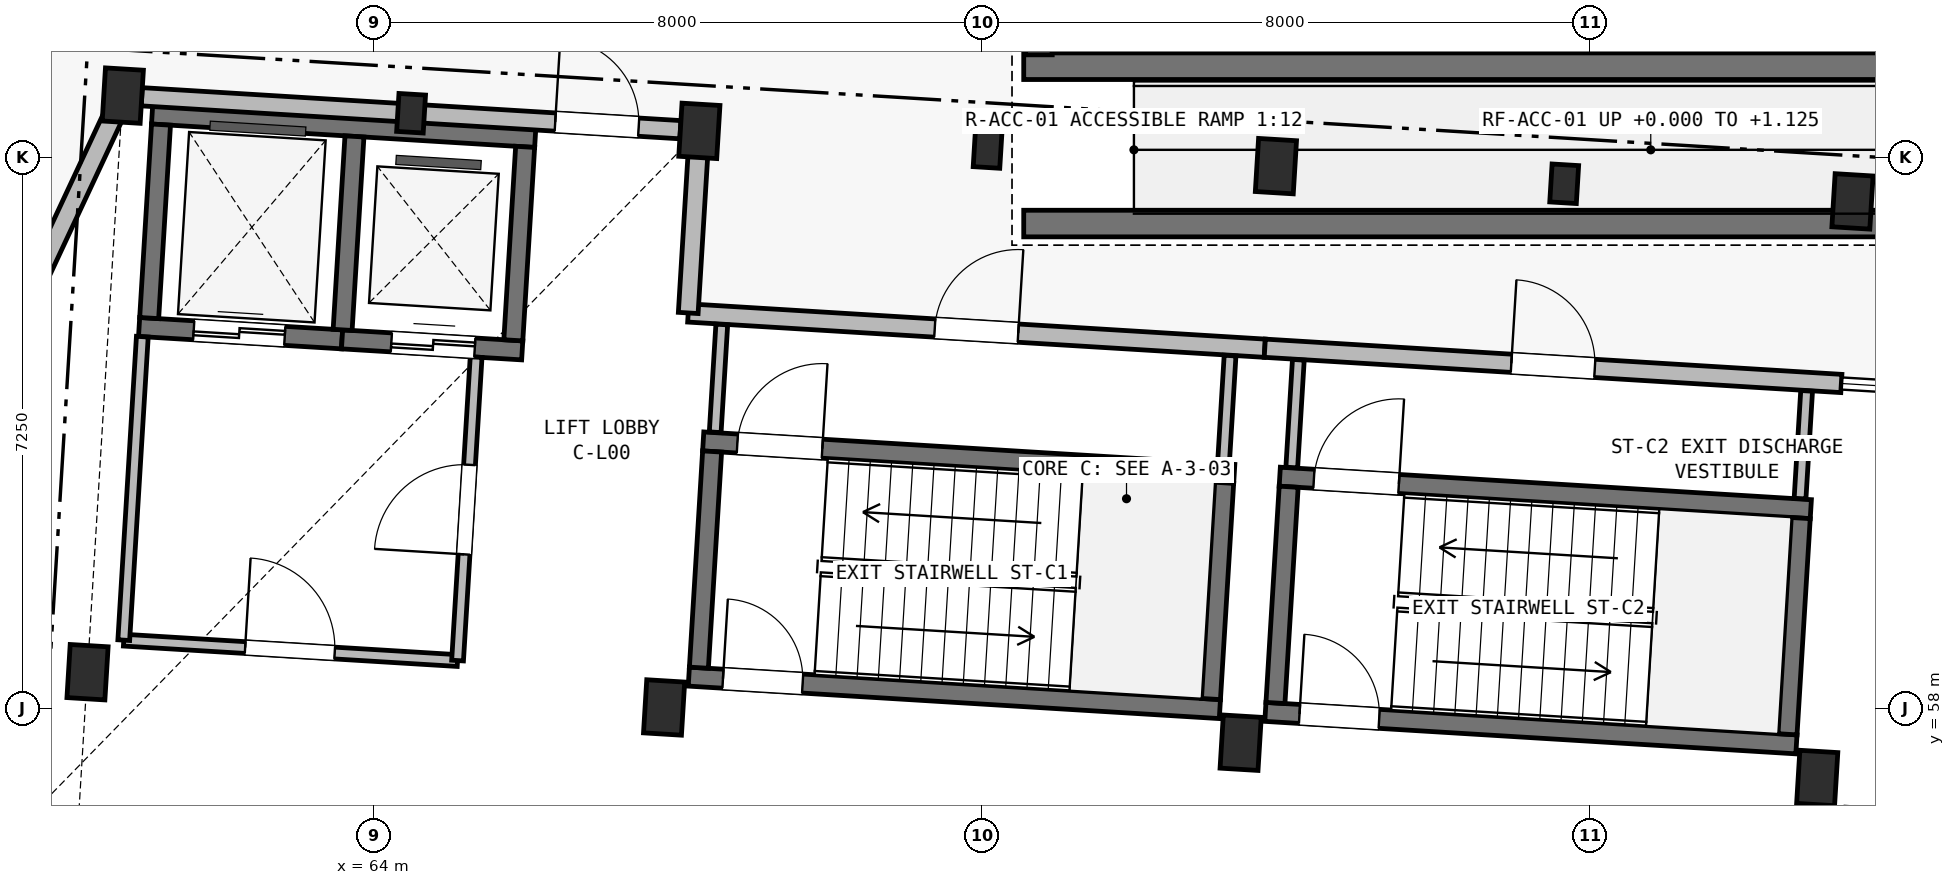
"""IFC4 building model, lengths in metres.
Left out: names, types, materials, properties, quantities, classifications, styles, units other than length and angle.
Written with IfcOpenShell. Run it as: python <this file> out.ifc"""

import sys

from ifc_helpers import new_model, si_unit, direction, frame, frame_2d, origin, origin_2d, place, context, subcontext, project, spatial, rectangle, extrude, element, fill, save


model = new_model("IFC4")
c1 = context("Model", 3, precision=1e-05, world=origin(), true_north=direction((0.0, 1.0)))
c2 = subcontext(c1, "Body", "Model", "MODEL_VIEW")
j1 = project(units=[si_unit("LENGTHUNIT", "METRE"), si_unit("PLANEANGLEUNIT", "RADIAN")], contexts=[c1])
p1 = place(None, origin())
s1 = spatial("IfcSite", under=j1, at=p1, CompositionType="ELEMENT")
p2 = place(p1, origin())
s2 = spatial("IfcBuilding", under=s1, at=p2, CompositionType="ELEMENT")
p3 = place(p2, origin())
s3 = spatial("IfcBuildingStorey", under=s2, at=p3, CompositionType="ELEMENT", Elevation=0.0)
for number, where, z_axis, x_axis in (
    (1, (60.233, 58.478, -0.35), (0.0, 0.0, 1.0), (0.998, -0.061, 0.0)),
    (2, (60.697, 66.063, -0.35), (0.0, 0.0, 1.0), (0.998, -0.061, 0.0)),
    (3, (67.818, 58.014, -0.35), (0.0, 0.0, 1.0), (0.998, -0.061, 0.0)),
    (4, (68.282, 65.599, -0.35), (0.0, 0.0, 1.0), (0.998, -0.061, 0.0)),
    (5, (75.404, 57.55, -0.35), (0.0, 0.0, 1.0), (0.998, -0.061, 0.0)),
    (6, (75.868, 65.135, -0.35), (0.0, 0.0, 1.0), (0.998, -0.061, 0.0)),
    (7, (82.99, 57.086, -0.35), (0.0, 0.0, 1.0), (0.998, -0.061, 0.0)),
    (8, (83.454, 64.672, -0.35), (0.0, 0.0, 1.0), (0.998, -0.061, 0.0)),
):
    element("IfcColumn", number, at=place(p3, frame(where, z_axis=z_axis, x_axis=x_axis)), inside=s3, PredefinedType="COLUMN", context=c2, shape_type="SweptSolid", body=[
        extrude(rectangle(XDim=0.5, YDim=0.7, at=origin_2d()), origin(), (0.0, 0.0, 1.0), 4.85),
    ])
for number, where, z_axis, x_axis in (
    (9, (64.49, 65.832, -0.35), (0.0, 0.0, 1.0), (0.998, -0.061, 0.0)),
    (10, (72.075, 65.367, -0.35), (0.0, 0.0, 1.0), (0.998, -0.061, 0.0)),
    (11, (79.661, 64.904, -0.35), (0.0, 0.0, 1.0), (0.998, -0.061, 0.0)),
):
    element("IfcColumn", number, at=place(p3, frame(where, z_axis=z_axis, x_axis=x_axis)), inside=s3, PredefinedType="PILASTER", context=c2, shape_type="SweptSolid", body=[
        extrude(rectangle(XDim=0.35, YDim=0.5, at=origin_2d()), origin(), (0.0, 0.0, 1.0), 3.7),
    ])
p4 = place(p3, frame((61.082, 65.814, -0.35), z_axis=(0.0, 0.0, 1.0), x_axis=(0.998134101522, -0.061059932685, 0.0)))
e12 = element("IfcWall", 12, at=p4, inside=s3, PredefinedType="SHEAR", context=c2, shape_type="SweptSolid", body=[
    extrude(rectangle(XDim=5.05, YDim=0.25, at=frame_2d((2.525, 0.0))), origin(), (0.0, 0.0, 1.0), 4.85),
])
p5 = place(p3, frame((60.911, 63.02, -0.35), z_axis=(0.0, 0.0, 1.0), x_axis=(0.998134099905, -0.061059959111, 0.0)))
e13 = element("IfcWall", 13, at=p5, inside=s3, PredefinedType="SHEAR", context=c2, shape_type="SweptSolid", body=[
    extrude(rectangle(XDim=2.675, YDim=0.25, at=frame_2d((1.337, 0.0))), origin(), (0.0, 0.0, 1.0), 4.85),
])
p6 = place(p5, frame((0.72, 0.0, 0.35)))
e14 = element("IfcOpeningElement", 14, at=p6, cuts=e13, PredefinedType="OPENING", context=c2, shape_type="SweptSolid", body=[
    extrude(rectangle(XDim=1.2, YDim=2.2, at=frame_2d((0.6, 1.1))), frame((0.0, 0.14, 0.0), z_axis=(0.0, -1.0, 0.0), x_axis=(1.0, 0.0, 0.0)), (0.0, 0.0, 1.0), 0.28),
])
p7 = place(p3, frame((63.581, 62.856, -0.35), z_axis=(0.0, 0.0, 1.0), x_axis=(0.998134103342, -0.061059902923, 0.0)))
e15 = element("IfcWall", 15, at=p7, inside=s3, PredefinedType="SHEAR", context=c2, shape_type="SweptSolid", body=[
    extrude(rectangle(XDim=2.375, YDim=0.25, at=frame_2d((1.188, 0.0))), origin(), (0.0, 0.0, 1.0), 4.85),
])
p8 = place(p7, frame((0.65, 0.0, 0.35)))
e16 = element("IfcOpeningElement", 16, at=p8, cuts=e15, PredefinedType="OPENING", context=c2, shape_type="SweptSolid", body=[
    extrude(rectangle(XDim=1.1, YDim=2.15, at=frame_2d((0.55, 1.075))), frame((0.0, 0.14, 0.0), z_axis=(0.0, -1.0, 0.0), x_axis=(1.0, 0.0, 0.0)), (0.0, 0.0, 1.0), 0.28),
])
p9 = place(p3, frame((61.043, 63.137, -0.35), z_axis=(0.0, 0.0, 1.0), x_axis=(0.061078919587, 0.998132939834, 0.0)))
e17 = element("IfcWall", 17, at=p9, inside=s3, PredefinedType="SHEAR", context=c2, shape_type="SweptSolid", body=[
    extrude(rectangle(XDim=2.55, YDim=0.25, at=frame_2d((1.275, 0.0))), origin(), (0.0, 0.0, 1.0), 4.85),
])
p10 = place(p3, frame((63.589, 62.981, -0.35), z_axis=(0.0, 0.0, 1.0), x_axis=(0.060989368901, 0.998138415692, 0.0)))
e18 = element("IfcWall", 18, at=p10, inside=s3, PredefinedType="SHEAR", context=c2, shape_type="SweptSolid", body=[
    extrude(rectangle(XDim=2.55, YDim=0.25, at=frame_2d((1.275, 0.0))), origin(), (0.0, 0.0, 1.0), 4.85),
])
p11 = place(p3, frame((65.834, 62.844, -0.35), z_axis=(0.0, 0.0, 1.0), x_axis=(0.061084756616, 0.998132582631, 0.0)))
e19 = element("IfcWall", 19, at=p11, inside=s3, PredefinedType="SHEAR", context=c2, shape_type="SweptSolid", body=[
    extrude(rectangle(XDim=2.55, YDim=0.25, at=frame_2d((1.275, 0.0))), origin(), (0.0, 0.0, 1.0), 4.85),
])
p12 = place(p3, frame((68.333, 61.514, -0.35), z_axis=(0.0, 0.0, 1.0), x_axis=(0.998135676081, -0.061034188237, 0.0)))
e20 = element("IfcWall", 20, at=p12, inside=s3, PredefinedType="SHEAR", context=c2, shape_type="SweptSolid", body=[
    extrude(rectangle(XDim=7.0, YDim=0.25, at=frame_2d((3.5, 0.0))), origin(), (0.0, 0.0, 1.0), 4.85),
])
p13 = place(p12, frame((0.45, 0.0, 0.35)))
e21 = element("IfcOpeningElement", 21, at=p13, cuts=e20, PredefinedType="OPENING", context=c2, shape_type="SweptSolid", body=[
    extrude(rectangle(XDim=1.12, YDim=2.15, at=frame_2d((0.56, 1.075))), frame((0.0, 0.14, 0.0), z_axis=(0.0, -1.0, 0.0), x_axis=(1.0, 0.0, 0.0)), (0.0, 0.0, 1.0), 0.28),
])
p14 = place(p3, frame((68.144, 58.419, -0.35), z_axis=(0.0, 0.0, 1.0), x_axis=(0.998135546153, -0.061036313012, 0.0)))
e22 = element("IfcWall", 22, at=p14, inside=s3, PredefinedType="SHEAR", context=c2, shape_type="SweptSolid", body=[
    extrude(rectangle(XDim=7.0, YDim=0.25, at=frame_2d((3.5, 0.0))), origin(), (0.0, 0.0, 1.0), 4.85),
])
p15 = place(p14, frame((0.45, 0.0, 0.35)))
e23 = element("IfcOpeningElement", 23, at=p15, cuts=e22, PredefinedType="OPENING", context=c2, shape_type="SweptSolid", body=[
    extrude(rectangle(XDim=1.05, YDim=2.15, at=frame_2d((0.525, 1.075))), frame((0.0, 0.14, 0.0), z_axis=(0.0, -1.0, 0.0), x_axis=(1.0, 0.0, 0.0)), (0.0, 0.0, 1.0), 0.28),
])
for number, where, z_axis, x_axis in (
    (24, (68.276, 58.537, -0.35), (0.0, 0.0, 1.0), (0.061, 0.998, 0.0)),
    (25, (75.014, 58.125, -0.35), (0.0, 0.0, 1.0), (0.061, 0.998, 0.0)),
):
    element("IfcWall", number, at=place(p3, frame(where, z_axis=z_axis, x_axis=x_axis)), inside=s3, PredefinedType="SHEAR", context=c2, shape_type="SweptSolid", body=[
        extrude(rectangle(XDim=2.85, YDim=0.25, at=frame_2d((1.425, 0.0))), origin(), (0.0, 0.0, 1.0), 4.85),
    ])
p16 = place(p3, frame((75.919, 61.05, -0.35), z_axis=(0.0, 0.0, 1.0), x_axis=(0.998135546153, -0.061036313012, 0.0)))
e26 = element("IfcWall", 26, at=p16, inside=s3, PredefinedType="SHEAR", context=c2, shape_type="SweptSolid", body=[
    extrude(rectangle(XDim=7.0, YDim=0.25, at=frame_2d((3.5, 0.0))), origin(), (0.0, 0.0, 1.0), 4.85),
])
p17 = place(p16, frame((0.45, 0.0, 0.35)))
e27 = element("IfcOpeningElement", 27, at=p17, cuts=e26, PredefinedType="OPENING", context=c2, shape_type="SweptSolid", body=[
    extrude(rectangle(XDim=1.12, YDim=2.15, at=frame_2d((0.56, 1.075))), frame((0.0, 0.14, 0.0), z_axis=(0.0, -1.0, 0.0), x_axis=(1.0, 0.0, 0.0)), (0.0, 0.0, 1.0), 0.28),
])
p18 = place(p3, frame((75.73, 57.956, -0.35), z_axis=(0.0, 0.0, 1.0), x_axis=(0.998135546153, -0.061036313012, 0.0)))
e28 = element("IfcWall", 28, at=p18, inside=s3, PredefinedType="SHEAR", context=c2, shape_type="SweptSolid", body=[
    extrude(rectangle(XDim=7.0, YDim=0.25, at=frame_2d((3.5, 0.0))), origin(), (0.0, 0.0, 1.0), 4.85),
])
p19 = place(p18, frame((0.45, 0.0, 0.35)))
e29 = element("IfcOpeningElement", 29, at=p19, cuts=e28, PredefinedType="OPENING", context=c2, shape_type="SweptSolid", body=[
    extrude(rectangle(XDim=1.05, YDim=2.15, at=frame_2d((0.525, 1.075))), frame((0.0, 0.14, 0.0), z_axis=(0.0, -1.0, 0.0), x_axis=(1.0, 0.0, 0.0)), (0.0, 0.0, 1.0), 0.28),
])
for number, where, z_axis, x_axis in (
    (30, (75.862, 58.073, -0.35), (0.0, 0.0, 1.0), (0.061, 0.998, 0.0)),
    (31, (82.599, 57.661, -0.35), (0.0, 0.0, 1.0), (0.061, 0.998, 0.0)),
):
    element("IfcWall", number, at=place(p3, frame(where, z_axis=z_axis, x_axis=x_axis)), inside=s3, PredefinedType="SHEAR", context=c2, shape_type="SweptSolid", body=[
        extrude(rectangle(XDim=2.85, YDim=0.25, at=frame_2d((1.425, 0.0))), origin(), (0.0, 0.0, 1.0), 4.85),
    ])
p20 = place(p3, frame((72.55, 64.38, -0.35), z_axis=(0.0, 0.0, 1.0), x_axis=(1.0, 0.0, 0.0)))
e32 = element("IfcWall", 32, at=p20, inside=s3, PredefinedType="USERDEFINED", context=c2, shape_type="SweptSolid", body=[
    extrude(rectangle(XDim=33.1, YDim=0.35, at=frame_2d((16.55, 0.0))), origin(), (0.0, 0.0, 1.0), 3.75),
])
p21 = place(p3, frame((72.55, 66.45, -0.35), z_axis=(0.0, 0.0, 1.0), x_axis=(1.0, 0.0, 0.0)))
e33 = element("IfcWall", 33, at=p21, inside=s3, PredefinedType="USERDEFINED", context=c2, shape_type="SweptSolid", body=[
    extrude(rectangle(XDim=33.1, YDim=0.35, at=frame_2d((16.55, 0.0))), origin(), (0.0, 0.0, 1.0), 5.97),
])
p22 = place(p3, frame((72.75, 66.6, -0.35), z_axis=(0.0, 0.0, 1.0), x_axis=(0.0, 1.0, 0.0)))
e34 = element("IfcWall", 34, at=p22, inside=s3, PredefinedType="USERDEFINED", context=c2, shape_type="SweptSolid", body=[
    extrude(rectangle(XDim=1.5, YDim=0.35, at=frame_2d((0.75, 0.0))), origin(), (0.0, 0.0, 1.0), 4.55),
])
p23 = place(p3, frame((60.946, 66.048, 0.0), z_axis=(0.0, 0.0, 1.0), x_axis=(0.99813569621, -0.061033859059, 0.0)))
e35 = element("IfcWall", 35, at=p23, inside=s3, PredefinedType="SOLIDWALL", context=c2, shape_type="SweptSolid", body=[
    extrude(rectangle(XDim=7.1, YDim=0.24, at=frame_2d((3.55, 0.0))), origin(), (0.0, 0.0, 1.0), 3.35),
])
p24 = place(p23, frame((5.45, 0.0, 0.0)))
e36 = element("IfcOpeningElement", 36, at=p24, cuts=e35, PredefinedType="OPENING", context=c2, shape_type="SweptSolid", body=[
    extrude(rectangle(XDim=1.1, YDim=2.15, at=frame_2d((0.55, 1.075))), frame((0.0, 0.135, 0.0), z_axis=(0.0, -1.0, 0.0), x_axis=(1.0, 0.0, 0.0)), (0.0, 0.0, 1.0), 0.27),
])
p25 = place(p3, frame((68.136, 63.204, 0.0), z_axis=(0.0, 0.0, 1.0), x_axis=(0.998135669243, -0.061034300063, 0.0)))
e37 = element("IfcWall", 37, at=p25, inside=s3, PredefinedType="SOLIDWALL", context=c2, shape_type="SweptSolid", body=[
    extrude(rectangle(XDim=7.6, YDim=0.24, at=frame_2d((3.8, 0.0))), origin(), (0.0, 0.0, 1.0), 3.35),
])
p26 = place(p25, frame((3.25, 0.0, 0.0)))
e38 = element("IfcOpeningElement", 38, at=p26, cuts=e37, PredefinedType="OPENING", context=c2, shape_type="SweptSolid", body=[
    extrude(rectangle(XDim=1.1, YDim=2.15, at=frame_2d((0.55, 1.075))), frame((0.0, 0.135, 0.0), z_axis=(0.0, -1.0, 0.0), x_axis=(1.0, 0.0, 0.0)), (0.0, 0.0, 1.0), 0.27),
])
p27 = place(p3, frame((75.722, 62.74, 0.0), z_axis=(0.0, 0.0, 1.0), x_axis=(0.998135669243, -0.061034300063, 0.0)))
e39 = element("IfcWall", 39, at=p27, inside=s3, PredefinedType="SOLIDWALL", context=c2, shape_type="SweptSolid", body=[
    extrude(rectangle(XDim=7.6, YDim=0.24, at=frame_2d((3.8, 0.0))), origin(), (0.0, 0.0, 1.0), 3.35),
])
p28 = place(p27, frame((3.25, 0.0, 0.0)))
e40 = element("IfcOpeningElement", 40, at=p28, cuts=e39, PredefinedType="OPENING", context=c2, shape_type="SweptSolid", body=[
    extrude(rectangle(XDim=1.1, YDim=2.15, at=frame_2d((0.55, 1.075))), frame((0.0, 0.135, 0.0), z_axis=(0.0, -1.0, 0.0), x_axis=(1.0, 0.0, 0.0)), (0.0, 0.0, 1.0), 0.27),
])
p29 = place(p3, frame((53.32, 50.284, 0.0), z_axis=(0.0, 0.0, 1.0), x_axis=(0.423516863973, 0.905888219335, 0.0)))
e41 = element("IfcWall", 41, at=p29, inside=s3, PredefinedType="SOLIDWALL", context=c2, shape_type="SweptSolid", body=[
    extrude(rectangle(XDim=17.418, YDim=0.26, at=frame_2d((8.709, 0.0))), origin(), (0.0, 0.0, 1.0), 3.35),
])
p30 = place(p3, frame((68.282, 65.599, 0.0), z_axis=(0.0, 0.0, 1.0), x_axis=(-0.061136950836, -0.998129387025, 0.0)))
e42 = element("IfcWall", 42, at=p30, inside=s3, PredefinedType="SOLIDWALL", context=c2, shape_type="SweptSolid", body=[
    extrude(rectangle(XDim=2.4, YDim=0.26, at=frame_2d((1.2, 0.0))), origin(), (0.0, 0.0, 1.0), 3.35),
])
p31 = place(p3, frame((60.709, 58.899, 0.0), z_axis=(0.0, 0.0, 1.0), x_axis=(0.998132276607, -0.061089756882, 0.0)))
e43 = element("IfcWall", 43, at=p31, inside=s3, PredefinedType="PARTITIONING", context=c2, shape_type="SweptSolid", body=[
    extrude(rectangle(XDim=4.4, YDim=0.155, at=frame_2d((2.2, 0.0))), origin(), (0.0, 0.0, 1.0), 4.22),
])
p32 = place(p31, frame((1.6, 0.0, 0.0)))
e44 = element("IfcOpeningElement", 44, at=p32, cuts=e43, PredefinedType="OPENING", context=c2, shape_type="SweptSolid", body=[
    extrude(rectangle(XDim=1.18, YDim=2.15, at=frame_2d((0.59, 1.075))), frame((0.0, 0.093, 0.0), z_axis=(0.0, -1.0, 0.0), x_axis=(1.0, 0.0, 0.0)), (0.0, 0.0, 1.0), 0.185),
])
p33 = place(p3, frame((60.709, 58.899, 0.0), z_axis=(0.0, 0.0, 1.0), x_axis=(0.061036844229, 0.998135513669, 0.0)))
e45 = element("IfcWall", 45, at=p33, inside=s3, PredefinedType="PARTITIONING", context=c2, shape_type="SweptSolid", body=[
    extrude(rectangle(XDim=4.0, YDim=0.155, at=frame_2d((2.0, 0.0))), origin(), (0.0, 0.0, 1.0), 3.35),
])
p34 = place(p3, frame((65.101, 58.631, 0.0), z_axis=(0.0, 0.0, 1.0), x_axis=(0.061033125904, 0.99813574104, 0.0)))
e46 = element("IfcWall", 46, at=p34, inside=s3, PredefinedType="PARTITIONING", context=c2, shape_type="SweptSolid", body=[
    extrude(rectangle(XDim=4.0, YDim=0.155, at=frame_2d((2.0, 0.0))), origin(), (0.0, 0.0, 1.0), 4.22),
])
p35 = place(p34, frame((1.4, 0.0, 0.0)))
e47 = element("IfcOpeningElement", 47, at=p35, cuts=e46, PredefinedType="OPENING", context=c2, shape_type="SweptSolid", body=[
    extrude(rectangle(XDim=1.18, YDim=2.15, at=frame_2d((0.59, 1.075))), frame((0.0, 0.093, 0.0), z_axis=(0.0, -1.0, 0.0), x_axis=(1.0, 0.0, 0.0)), (0.0, 0.0, 1.0), 0.185),
])
p36 = place(p3, frame((68.491, 61.634, 0.0), z_axis=(0.0, 0.0, 1.0), x_axis=(0.06102966984, 0.998135952363, 0.0)))
e48 = element("IfcWall", 48, at=p36, inside=s3, PredefinedType="PARTITIONING", context=c2, shape_type="SweptSolid", body=[
    extrude(rectangle(XDim=1.42, YDim=0.155, at=frame_2d((0.71, 0.0))), origin(), (0.0, 0.0, 1.0), 3.35),
])
for number, where, z_axis, x_axis in (
    (49, (75.178, 61.225, 0.0), (0.0, 0.0, 1.0), (0.061, 0.998, 0.0)),
    (50, (76.076, 61.17, 0.0), (0.0, 0.0, 1.0), (0.061, 0.998, 0.0)),
    (51, (82.764, 60.761, 0.0), (0.0, 0.0, 1.0), (0.061, 0.998, 0.0)),
):
    element("IfcWall", number, at=place(p3, frame(where, z_axis=z_axis, x_axis=x_axis)), inside=s3, PredefinedType="PARTITIONING", context=c2, shape_type="SweptSolid", body=[
        extrude(rectangle(XDim=1.42, YDim=0.155, at=frame_2d((0.71, 0.0))), origin(), (0.0, 0.0, 1.0), 3.35),
    ])
p37 = place(p24, origin())
e52 = element("IfcDoor", 52, at=p37, inside=s3, OperationType="SINGLE_SWING_LEFT", PredefinedType="DOOR", context=c2, shape_type="SweptSolid", body=[
    extrude(rectangle(XDim=1.1, YDim=2.15, at=frame_2d((0.55, 1.075))), frame((0.0, 0.025, 0.0), z_axis=(0.0, -1.0, 0.0), x_axis=(1.0, 0.0, 0.0)), (0.0, 0.0, 1.0), 0.05),
])
fill(e36, e52)
p38 = place(p26, origin())
e53 = element("IfcDoor", 53, at=p38, inside=s3, OperationType="SINGLE_SWING_RIGHT", PredefinedType="DOOR", context=c2, shape_type="SweptSolid", body=[
    extrude(rectangle(XDim=1.1, YDim=2.15, at=frame_2d((0.55, 1.075))), frame((0.0, 0.025, 0.0), z_axis=(0.0, -1.0, 0.0), x_axis=(1.0, 0.0, 0.0)), (0.0, 0.0, 1.0), 0.05),
])
fill(e38, e53)
p39 = place(p28, origin())
e54 = element("IfcDoor", 54, at=p39, inside=s3, OperationType="SINGLE_SWING_LEFT", PredefinedType="DOOR", context=c2, shape_type="SweptSolid", body=[
    extrude(rectangle(XDim=1.1, YDim=2.15, at=frame_2d((0.55, 1.075))), frame((0.0, 0.025, 0.0), z_axis=(0.0, -1.0, 0.0), x_axis=(1.0, 0.0, 0.0)), (0.0, 0.0, 1.0), 0.05),
])
fill(e40, e54)
p40 = place(p32, origin())
e55 = element("IfcDoor", 55, at=p40, inside=s3, OperationType="SINGLE_SWING_LEFT", PredefinedType="DOOR", context=c2, shape_type="SweptSolid", body=[
    extrude(rectangle(XDim=1.18, YDim=2.15, at=frame_2d((0.59, 1.075))), frame((0.0, 0.025, 0.0), z_axis=(0.0, -1.0, 0.0), x_axis=(1.0, 0.0, 0.0)), (0.0, 0.0, 1.0), 0.05),
])
fill(e44, e55)
p41 = place(p35, origin())
e56 = element("IfcDoor", 56, at=p41, inside=s3, OperationType="SINGLE_SWING_LEFT", PredefinedType="DOOR", context=c2, shape_type="SweptSolid", body=[
    extrude(rectangle(XDim=1.18, YDim=2.15, at=frame_2d((0.59, 1.075))), frame((0.0, 0.025, 0.0), z_axis=(0.0, -1.0, 0.0), x_axis=(1.0, 0.0, 0.0)), (0.0, 0.0, 1.0), 0.05),
])
fill(e47, e56)
p42 = place(p15, origin())
e57 = element("IfcDoor", 57, at=p42, inside=s3, OperationType="SINGLE_SWING_LEFT", PredefinedType="DOOR", context=c2, shape_type="SweptSolid", body=[
    extrude(rectangle(XDim=1.05, YDim=2.15, at=frame_2d((0.525, 1.075))), frame((0.0, 0.025, 0.0), z_axis=(0.0, -1.0, 0.0), x_axis=(1.0, 0.0, 0.0)), (0.0, 0.0, 1.0), 0.05),
])
fill(e23, e57)
p43 = place(p13, origin())
e58 = element("IfcDoor", 58, at=p43, inside=s3, OperationType="SINGLE_SWING_RIGHT", PredefinedType="DOOR", context=c2, shape_type="SweptSolid", body=[
    extrude(rectangle(XDim=1.12, YDim=2.15, at=frame_2d((0.56, 1.075))), frame((0.0, 0.025, 0.0), z_axis=(0.0, -1.0, 0.0), x_axis=(1.0, 0.0, 0.0)), (0.0, 0.0, 1.0), 0.05),
])
fill(e21, e58)
p44 = place(p19, origin())
e59 = element("IfcDoor", 59, at=p44, inside=s3, OperationType="SINGLE_SWING_LEFT", PredefinedType="DOOR", context=c2, shape_type="SweptSolid", body=[
    extrude(rectangle(XDim=1.05, YDim=2.15, at=frame_2d((0.525, 1.075))), frame((0.0, 0.025, 0.0), z_axis=(0.0, -1.0, 0.0), x_axis=(1.0, 0.0, 0.0)), (0.0, 0.0, 1.0), 0.05),
])
fill(e29, e59)
p45 = place(p17, origin())
e60 = element("IfcDoor", 60, at=p45, inside=s3, OperationType="SINGLE_SWING_RIGHT", PredefinedType="DOOR", context=c2, shape_type="SweptSolid", body=[
    extrude(rectangle(XDim=1.12, YDim=2.15, at=frame_2d((0.56, 1.075))), frame((0.0, 0.025, 0.0), z_axis=(0.0, -1.0, 0.0), x_axis=(1.0, 0.0, 0.0)), (0.0, 0.0, 1.0), 0.05),
])
fill(e27, e60)
p46 = place(p6, origin())
e61 = element("IfcDoor", 61, at=p46, inside=s3, OperationType="DOUBLE_DOOR_SLIDING", PredefinedType="DOOR", context=c2, shape_type="SweptSolid", body=[
    extrude(rectangle(XDim=1.2, YDim=2.2, at=frame_2d((0.6, 1.1))), frame((0.0, 0.025, 0.0), z_axis=(0.0, -1.0, 0.0), x_axis=(1.0, 0.0, 0.0)), (0.0, 0.0, 1.0), 0.05),
])
fill(e14, e61)
p47 = place(p8, origin())
e62 = element("IfcDoor", 62, at=p47, inside=s3, OperationType="DOUBLE_DOOR_SLIDING", PredefinedType="DOOR", context=c2, shape_type="SweptSolid", body=[
    extrude(rectangle(XDim=1.1, YDim=2.15, at=frame_2d((0.55, 1.075))), frame((0.0, 0.025, 0.0), z_axis=(0.0, -1.0, 0.0), x_axis=(1.0, 0.0, 0.0)), (0.0, 0.0, 1.0), 0.05),
])
fill(e16, e62)
save(model, sys.argv[1])
